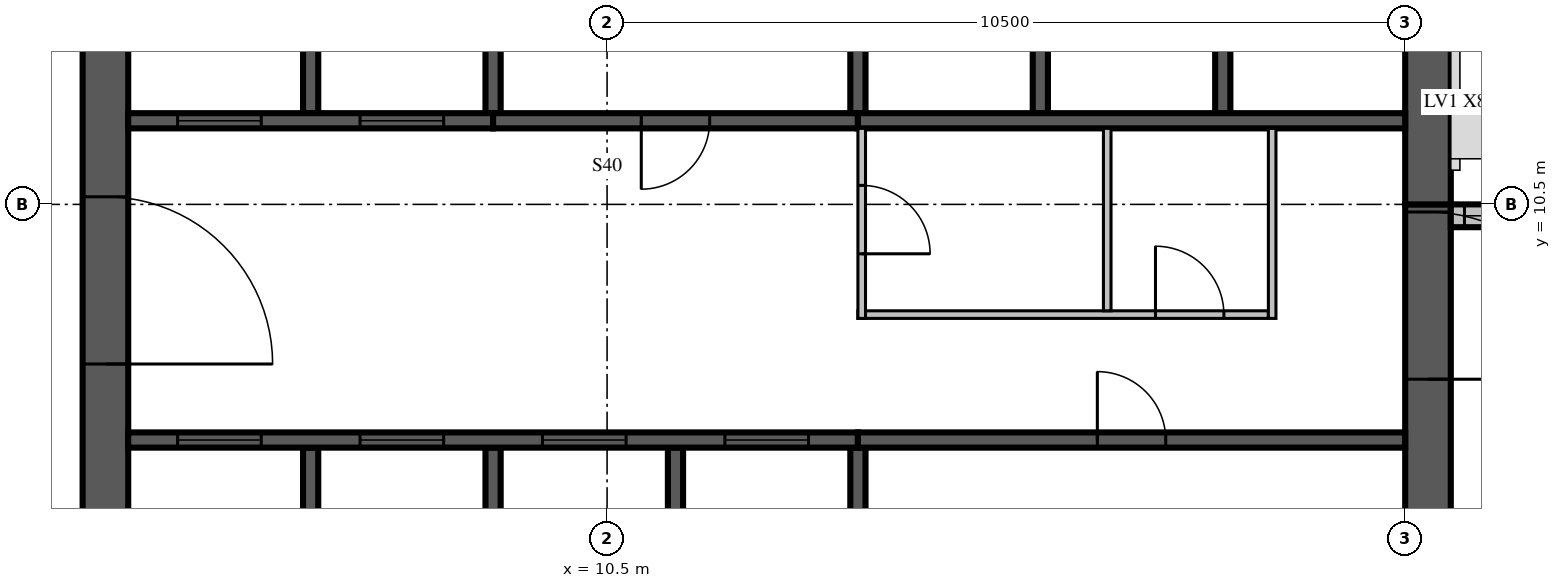
"""IFC4 building model, lengths in metres.
Left out: names, types, materials, properties, quantities, classifications, styles, units other than length and angle.
Written with IfcOpenShell. Run it as: python <this file> out.ifc"""

import sys

from ifc_helpers import new_model, si_unit, direction, frame, frame_2d, origin, place, context, subcontext, project, spatial, rectangle, extrude, source, transform, mapped, element, fill, save


model = new_model("IFC4")
c1 = context("Model", 3, precision=1e-05, world=origin(), true_north=direction((0.0, 1.0)))
c2 = subcontext(c1, "Body", "Model", "MODEL_VIEW")
j1 = project(units=[si_unit("LENGTHUNIT", "METRE"), si_unit("PLANEANGLEUNIT", "RADIAN")], contexts=[c1])
p1 = place(None, origin())
s1 = spatial("IfcSite", under=j1, at=p1, CompositionType="ELEMENT")
p2 = place(p1, origin())
s2 = spatial("IfcBuilding", under=s1, at=p2, CompositionType="ELEMENT")
p3 = place(p2, frame((0.0, 0.0, 309.0)))
s3 = spatial("IfcBuildingStorey", under=s2, at=p3, CompositionType="ELEMENT", Elevation=309.0)
m1 = source(origin(), c2, "Body", "SweptSolid", [
    extrude(rectangle(XDim=17.4, YDim=0.6, at=frame_2d((8.7, 0.0))), origin(), (0.0, 0.0, 1.0), 3.5),
])
p4 = place(p3, frame((3.9, 4.2, 0.0), z_axis=(0.0, 0.0, 1.0), x_axis=(0.0, 1.0, 0.0)))
e1 = element("IfcWall", 1, at=p4, inside=s3, PredefinedType="SHEAR", context=c2, shape_type="MappedRepresentation", body=[
    mapped(m1, transform((0.0, 0.0, 0.0), scale=1.0)),
])
m2 = source(origin(), c2, "Body", "SweptSolid", [
    extrude(rectangle(XDim=2.2, YDim=2.1, at=frame_2d((1.1, 1.05))), frame((0.0, 0.31, 0.0), z_axis=(0.0, -1.0, 0.0), x_axis=(1.0, 0.0, 0.0)), (0.0, 0.0, 1.0), 0.62),
])
p5 = place(p4, frame((4.2, 0.0, 0.0)))
e2 = element("IfcOpeningElement", 2, at=p5, cuts=e1, PredefinedType="OPENING", context=c2, shape_type="MappedRepresentation", body=[
    mapped(m2, transform((0.0, 0.0, 0.0), scale=1.0)),
])
m3 = source(origin(), c2, "Body", "SweptSolid", [
    extrude(rectangle(XDim=6.3, YDim=0.6, at=frame_2d((3.15, 0.0))), origin(), (0.0, 0.0, 1.0), 3.5),
])
p6 = place(p3, frame((21.3, 4.2, 0.0), z_axis=(0.0, 0.0, 1.0), x_axis=(0.0, 1.0, 0.0)))
e3 = element("IfcWall", 3, at=p6, inside=s3, PredefinedType="SHEAR", context=c2, shape_type="MappedRepresentation", body=[
    mapped(m3, transform((0.0, 0.0, 0.0), scale=1.0)),
])
p7 = place(p6, frame((4.0, 0.0, 0.0)))
e4 = element("IfcOpeningElement", 4, at=p7, cuts=e3, PredefinedType="OPENING", context=c2, shape_type="MappedRepresentation", body=[
    mapped(m2, transform((0.0, 0.0, 0.0), scale=1.0)),
])
m4 = source(origin(), c2, "Body", "SweptSolid", [
    extrude(rectangle(XDim=10.5, YDim=0.6, at=frame_2d((5.25, 0.0))), origin(), (0.0, 0.0, 1.0), 3.5),
])
p8 = place(p3, frame((21.3, 10.5, 0.0), z_axis=(0.0, 0.0, 1.0), x_axis=(0.0, 1.0, 0.0)))
e5 = element("IfcWall", 5, at=p8, inside=s3, PredefinedType="SHEAR", context=c2, shape_type="MappedRepresentation", body=[
    mapped(m4, transform((0.0, 0.0, 0.0), scale=1.0)),
])
m5 = source(origin(), c2, "Body", "SweptSolid", [
    extrude(rectangle(XDim=1.2, YDim=2.4, at=frame_2d((0.6, 1.2))), frame((0.0, 0.31, 0.0), z_axis=(0.0, -1.0, 0.0), x_axis=(1.0, 0.0, 0.0)), (0.0, 0.0, 1.0), 0.62),
])
p9 = place(p8, frame((5.7, 0.0, 0.6)))
e6 = element("IfcOpeningElement", 6, at=p9, cuts=e5, PredefinedType="OPENING", context=c2, shape_type="MappedRepresentation", body=[
    mapped(m5, transform((0.0, 0.0, 0.0), scale=1.0)),
])
m6 = source(origin(), c2, "Body", "SweptSolid", [
    extrude(rectangle(XDim=7.45, YDim=0.3, at=frame_2d((3.725, 0.0))), origin(), (0.0, 0.0, 1.0), 3.1),
])
p10 = place(p3, frame((29.05, 10.35, 0.0), z_axis=(0.0, 0.0, 1.0), x_axis=(-1.0, 0.0, 0.0)))
e7 = element("IfcWall", 7, at=p10, inside=s3, PredefinedType="STANDARD", context=c2, shape_type="MappedRepresentation", body=[
    mapped(m6, transform((0.0, 0.0, 0.0), scale=1.0)),
])
m7 = source(origin(), c2, "Body", "SweptSolid", [
    extrude(rectangle(XDim=3.0, YDim=2.0, at=frame_2d((1.5, 1.0))), frame((0.0, 0.16, 0.0), z_axis=(0.0, -1.0, 0.0), x_axis=(1.0, 0.0, 0.0)), (0.0, 0.0, 1.0), 0.32),
])
p11 = place(p10, frame((1.09, 0.0, 0.6)))
e8 = element("IfcOpeningElement", 8, at=p11, cuts=e7, PredefinedType="OPENING", context=c2, shape_type="MappedRepresentation", body=[
    mapped(m7, transform((0.0, 0.0, 0.0), scale=1.0)),
])
m8 = source(origin(), c2, "Body", "SweptSolid", [
    extrude(rectangle(XDim=1.8, YDim=2.0, at=frame_2d((0.9, 1.0))), frame((0.0, 0.16, 0.0), z_axis=(0.0, -1.0, 0.0), x_axis=(1.0, 0.0, 0.0)), (0.0, 0.0, 1.0), 0.32),
])
p12 = place(p10, frame((5.47, 0.0, 0.6)))
e9 = element("IfcOpeningElement", 9, at=p12, cuts=e7, PredefinedType="OPENING", context=c2, shape_type="MappedRepresentation", body=[
    mapped(m8, transform((0.0, 0.0, 0.0), scale=1.0)),
])
m9 = source(origin(), c2, "Body", "SweptSolid", [
    extrude(rectangle(XDim=3.1, YDim=0.2, at=frame_2d((1.55, 0.0))), origin(), (0.0, 0.0, 1.0), 3.5),
])
for number, where, z_axis, x_axis in (
    (10, (6.6, 4.2, 0.0), (0.0, 0.0, 1.0), (0.0, 1.0, 0.0)),
    (11, (9.0, 4.2, 0.0), (0.0, 0.0, 1.0), (0.0, 1.0, 0.0)),
    (12, (11.4, 4.2, 0.0), (0.0, 0.0, 1.0), (0.0, 1.0, 0.0)),
):
    element("IfcWall", number, at=place(p3, frame(where, z_axis=z_axis, x_axis=x_axis)), inside=s3, PredefinedType="SOLIDWALL", context=c2, shape_type="MappedRepresentation", body=[
        mapped(m9, transform((0.0, 0.0, 0.0), scale=1.0)),
    ])
m10 = source(origin(), c2, "Body", "SweptSolid", [
    extrude(rectangle(XDim=3.1, YDim=0.2, at=frame_2d((1.55, 0.0))), origin(), (0.0, 0.0, 1.0), 3.1),
])
p13 = place(p3, frame((13.8, 4.2, 0.0), z_axis=(0.0, 0.0, 1.0), x_axis=(0.0, 1.0, 0.0)))
e13 = element("IfcWall", 13, at=p13, inside=s3, PredefinedType="SOLIDWALL", context=c2, shape_type="MappedRepresentation", body=[
    mapped(m10, transform((0.0, 0.0, 0.0), scale=1.0)),
])
m11 = source(origin(), c2, "Body", "SweptSolid", [
    extrude(rectangle(XDim=3.0, YDim=0.2, at=frame_2d((1.5, 0.0))), origin(), (0.0, 0.0, 1.0), 3.5),
])
p14 = place(p3, frame((6.6, 11.7, 0.0), z_axis=(0.0, 0.0, 1.0), x_axis=(0.0, 1.0, 0.0)))
e14 = element("IfcWall", 14, at=p14, inside=s3, PredefinedType="SOLIDWALL", context=c2, shape_type="MappedRepresentation", body=[
    mapped(m11, transform((0.0, 0.0, 0.0), scale=1.0)),
])
m12 = source(origin(), c2, "Body", "SweptSolid", [
    extrude(rectangle(XDim=3.0, YDim=0.2, at=frame_2d((1.5, 0.0))), origin(), (0.0, 0.0, 1.0), 3.1),
])
for number, where, z_axis, x_axis in (
    (15, (9.0, 11.7, 0.0), (0.0, 0.0, 1.0), (0.0, 1.0, 0.0)),
    (16, (13.8, 11.7, 0.0), (0.0, 0.0, 1.0), (0.0, 1.0, 0.0)),
):
    element("IfcWall", number, at=place(p3, frame(where, z_axis=z_axis, x_axis=x_axis)), inside=s3, PredefinedType="SOLIDWALL", context=c2, shape_type="MappedRepresentation", body=[
        mapped(m12, transform((0.0, 0.0, 0.0), scale=1.0)),
    ])
for number, where, z_axis, x_axis in (
    (17, (16.2, 11.7, 0.0), (0.0, 0.0, 1.0), (0.0, 1.0, 0.0)),
    (18, (18.6, 11.7, 0.0), (0.0, 0.0, 1.0), (0.0, 1.0, 0.0)),
):
    element("IfcWall", number, at=place(p3, frame(where, z_axis=z_axis, x_axis=x_axis)), inside=s3, PredefinedType="SOLIDWALL", context=c2, shape_type="MappedRepresentation", body=[
        mapped(m11, transform((0.0, 0.0, 0.0), scale=1.0)),
    ])
m13 = source(origin(), c2, "Body", "SweptSolid", [
    extrude(rectangle(XDim=9.6, YDim=0.2, at=frame_2d((4.8, 0.0))), origin(), (0.0, 0.0, 1.0), 3.5),
])
p15 = place(p3, frame((4.2, 7.4, 0.0), z_axis=(0.0, 0.0, 1.0), x_axis=(1.0, 0.0, 0.0)))
e19 = element("IfcWall", 19, at=p15, inside=s3, PredefinedType="SOLIDWALL", context=c2, shape_type="MappedRepresentation", body=[
    mapped(m13, transform((0.0, 0.0, 0.0), scale=1.0)),
])
m14 = source(origin(), c2, "Body", "SweptSolid", [
    extrude(rectangle(XDim=1.1, YDim=2.1, at=frame_2d((0.55, 1.05))), frame((0.0, 0.11, 0.0), z_axis=(0.0, -1.0, 0.0), x_axis=(1.0, 0.0, 0.0)), (0.0, 0.0, 1.0), 0.22),
])
p16 = place(p15, frame((0.65, 0.0, 0.0)))
e20 = element("IfcOpeningElement", 20, at=p16, cuts=e19, PredefinedType="OPENING", context=c2, shape_type="MappedRepresentation", body=[
    mapped(m14, transform((0.0, 0.0, 0.0), scale=1.0)),
])
p17 = place(p15, frame((3.05, 0.0, 0.0)))
e21 = element("IfcOpeningElement", 21, at=p17, cuts=e19, PredefinedType="OPENING", context=c2, shape_type="MappedRepresentation", body=[
    mapped(m14, transform((0.0, 0.0, 0.0), scale=1.0)),
])
p18 = place(p15, frame((5.45, 0.0, 0.0)))
e22 = element("IfcOpeningElement", 22, at=p18, cuts=e19, PredefinedType="OPENING", context=c2, shape_type="MappedRepresentation", body=[
    mapped(m14, transform((0.0, 0.0, 0.0), scale=1.0)),
])
p19 = place(p15, frame((7.85, 0.0, 0.0)))
e23 = element("IfcOpeningElement", 23, at=p19, cuts=e19, PredefinedType="OPENING", context=c2, shape_type="MappedRepresentation", body=[
    mapped(m14, transform((0.0, 0.0, 0.0), scale=1.0)),
])
m15 = source(origin(), c2, "Body", "SweptSolid", [
    extrude(rectangle(XDim=7.2, YDim=0.2, at=frame_2d((3.6, 0.0))), origin(), (0.0, 0.0, 1.0), 3.1),
])
p20 = place(p3, frame((13.8, 7.4, 0.0), z_axis=(0.0, 0.0, 1.0), x_axis=(1.0, 0.0, 0.0)))
e24 = element("IfcWall", 24, at=p20, inside=s3, PredefinedType="SOLIDWALL", context=c2, shape_type="MappedRepresentation", body=[
    mapped(m15, transform((0.0, 0.0, 0.0), scale=1.0)),
])
m16 = source(origin(), c2, "Body", "SweptSolid", [
    extrude(rectangle(XDim=0.9, YDim=2.1, at=frame_2d((0.45, 1.05))), frame((0.0, 0.11, 0.0), z_axis=(0.0, -1.0, 0.0), x_axis=(1.0, 0.0, 0.0)), (0.0, 0.0, 1.0), 0.22),
])
p21 = place(p20, frame((3.15, 0.0, 0.0)))
e25 = element("IfcOpeningElement", 25, at=p21, cuts=e24, PredefinedType="OPENING", context=c2, shape_type="MappedRepresentation", body=[
    mapped(m16, transform((0.0, 0.0, 0.0), scale=1.0)),
])
m17 = source(origin(), c2, "Body", "SweptSolid", [
    extrude(rectangle(XDim=4.8, YDim=0.2, at=frame_2d((2.4, 0.0))), origin(), (0.0, 0.0, 1.0), 3.5),
])
p22 = place(p3, frame((4.2, 11.6, 0.0), z_axis=(0.0, 0.0, 1.0), x_axis=(1.0, 0.0, 0.0)))
e26 = element("IfcWall", 26, at=p22, inside=s3, PredefinedType="SOLIDWALL", context=c2, shape_type="MappedRepresentation", body=[
    mapped(m17, transform((0.0, 0.0, 0.0), scale=1.0)),
])
p23 = place(p22, frame((0.65, 0.0, 0.0)))
e27 = element("IfcOpeningElement", 27, at=p23, cuts=e26, PredefinedType="OPENING", context=c2, shape_type="MappedRepresentation", body=[
    mapped(m14, transform((0.0, 0.0, 0.0), scale=1.0)),
])
p24 = place(p22, frame((3.05, 0.0, 0.0)))
e28 = element("IfcOpeningElement", 28, at=p24, cuts=e26, PredefinedType="OPENING", context=c2, shape_type="MappedRepresentation", body=[
    mapped(m14, transform((0.0, 0.0, 0.0), scale=1.0)),
])
m18 = source(origin(), c2, "Body", "SweptSolid", [
    extrude(rectangle(XDim=4.8, YDim=0.2, at=frame_2d((2.4, 0.0))), origin(), (0.0, 0.0, 1.0), 3.1),
])
p25 = place(p3, frame((9.0, 11.6, 0.0), z_axis=(0.0, 0.0, 1.0), x_axis=(1.0, 0.0, 0.0)))
e29 = element("IfcWall", 29, at=p25, inside=s3, PredefinedType="SOLIDWALL", context=c2, shape_type="MappedRepresentation", body=[
    mapped(m18, transform((0.0, 0.0, 0.0), scale=1.0)),
])
p26 = place(p25, frame((1.95, 0.0, 0.0)))
e30 = element("IfcOpeningElement", 30, at=p26, cuts=e29, PredefinedType="OPENING", context=c2, shape_type="MappedRepresentation", body=[
    mapped(m16, transform((0.0, 0.0, 0.0), scale=1.0)),
])
m19 = source(origin(), c2, "Body", "SweptSolid", [
    extrude(rectangle(XDim=7.2, YDim=0.2, at=frame_2d((3.6, 0.0))), origin(), (0.0, 0.0, 1.0), 3.5),
])
p27 = place(p3, frame((13.8, 11.6, 0.0), z_axis=(0.0, 0.0, 1.0), x_axis=(1.0, 0.0, 0.0)))
e31 = element("IfcWall", 31, at=p27, inside=s3, PredefinedType="SOLIDWALL", context=c2, shape_type="MappedRepresentation", body=[
    mapped(m19, transform((0.0, 0.0, 0.0), scale=1.0)),
])
m20 = source(origin(), c2, "Body", "SweptSolid", [
    extrude(rectangle(XDim=5.4, YDim=0.1, at=frame_2d((2.7, 0.0))), origin(), (0.0, 0.0, 1.0), 3.1),
])
p28 = place(p3, frame((13.8, 9.05, 0.0), z_axis=(0.0, 0.0, 1.0), x_axis=(1.0, 0.0, 0.0)))
e32 = element("IfcWall", 32, at=p28, inside=s3, PredefinedType="PARTITIONING", context=c2, shape_type="MappedRepresentation", body=[
    mapped(m20, transform((0.0, 0.0, 0.0), scale=1.0)),
])
m21 = source(origin(), c2, "Body", "SweptSolid", [
    extrude(rectangle(XDim=0.9, YDim=2.1, at=frame_2d((0.45, 1.05))), frame((0.0, 0.06, 0.0), z_axis=(0.0, -1.0, 0.0), x_axis=(1.0, 0.0, 0.0)), (0.0, 0.0, 1.0), 0.12),
])
p29 = place(p28, frame((3.915, 0.0, 0.0)))
e33 = element("IfcOpeningElement", 33, at=p29, cuts=e32, PredefinedType="OPENING", context=c2, shape_type="MappedRepresentation", body=[
    mapped(m21, transform((0.0, 0.0, 0.0), scale=1.0)),
])
m22 = source(origin(), c2, "Body", "SweptSolid", [
    extrude(rectangle(XDim=2.5, YDim=0.1, at=frame_2d((1.25, 0.0))), origin(), (0.0, 0.0, 1.0), 3.1),
])
p30 = place(p3, frame((13.85, 9.0, 0.0), z_axis=(0.0, 0.0, 1.0), x_axis=(0.0, 1.0, 0.0)))
e34 = element("IfcWall", 34, at=p30, inside=s3, PredefinedType="PARTITIONING", context=c2, shape_type="MappedRepresentation", body=[
    mapped(m22, transform((0.0, 0.0, 0.0), scale=1.0)),
])
p31 = place(p30, frame((0.85, 0.0, 0.0)))
e35 = element("IfcOpeningElement", 35, at=p31, cuts=e34, PredefinedType="OPENING", context=c2, shape_type="MappedRepresentation", body=[
    mapped(m21, transform((0.0, 0.0, 0.0), scale=1.0)),
])
m23 = source(origin(), c2, "Body", "SweptSolid", [
    extrude(rectangle(XDim=2.4, YDim=0.1, at=frame_2d((1.2, 0.0))), origin(), (0.0, 0.0, 1.0), 3.1),
])
p32 = place(p3, frame((17.08, 9.1, 0.0), z_axis=(0.0, 0.0, 1.0), x_axis=(0.0, 1.0, 0.0)))
e36 = element("IfcWall", 36, at=p32, inside=s3, PredefinedType="PARTITIONING", context=c2, shape_type="MappedRepresentation", body=[
    mapped(m23, transform((0.0, 0.0, 0.0), scale=1.0)),
])
p33 = place(p3, frame((19.25, 9.0, 0.0), z_axis=(0.0, 0.0, 1.0), x_axis=(0.0, 1.0, 0.0)))
e37 = element("IfcWall", 37, at=p33, inside=s3, PredefinedType="PARTITIONING", context=c2, shape_type="MappedRepresentation", body=[
    mapped(m22, transform((0.0, 0.0, 0.0), scale=1.0)),
])
m24 = source(origin(), c2, "Body", "SweptSolid", [
    extrude(rectangle(XDim=1.8, YDim=2.0, at=frame_2d((0.9, 1.0))), frame((0.0, 0.03, 0.0), z_axis=(0.0, -1.0, 0.0), x_axis=(1.0, 0.0, 0.0)), (0.0, 0.0, 1.0), 0.06),
])
p34 = place(p12, origin())
e38 = element("IfcWindow", 38, at=p34, inside=s3, PartitioningType="SINGLE_PANEL", PredefinedType="WINDOW", context=c2, shape_type="MappedRepresentation", body=[
    mapped(m24, transform((0.0, 0.0, 0.0), scale=1.0)),
])
fill(e9, e38)
m25 = source(origin(), c2, "Body", "SweptSolid", [
    extrude(rectangle(XDim=1.1, YDim=2.1, at=frame_2d((0.55, 1.05))), frame((0.0, 0.025, 0.0), z_axis=(0.0, -1.0, 0.0), x_axis=(1.0, 0.0, 0.0)), (0.0, 0.0, 1.0), 0.05),
])
p35 = place(p16, origin())
e39 = element("IfcDoor", 39, at=p35, inside=s3, OperationType="SLIDING_TO_LEFT", PredefinedType="DOOR", context=c2, shape_type="MappedRepresentation", body=[
    mapped(m25, transform((0.0, 0.0, 0.0), scale=1.0)),
])
fill(e20, e39)
p36 = place(p17, origin())
e40 = element("IfcDoor", 40, at=p36, inside=s3, OperationType="SLIDING_TO_LEFT", PredefinedType="DOOR", context=c2, shape_type="MappedRepresentation", body=[
    mapped(m25, transform((0.0, 0.0, 0.0), scale=1.0)),
])
fill(e21, e40)
p37 = place(p18, origin())
e41 = element("IfcDoor", 41, at=p37, inside=s3, OperationType="SLIDING_TO_LEFT", PredefinedType="DOOR", context=c2, shape_type="MappedRepresentation", body=[
    mapped(m25, transform((0.0, 0.0, 0.0), scale=1.0)),
])
fill(e22, e41)
p38 = place(p19, origin())
e42 = element("IfcDoor", 42, at=p38, inside=s3, OperationType="SLIDING_TO_LEFT", PredefinedType="DOOR", context=c2, shape_type="MappedRepresentation", body=[
    mapped(m25, transform((0.0, 0.0, 0.0), scale=1.0)),
])
fill(e23, e42)
m26 = source(origin(), c2, "Body", "SweptSolid", [
    extrude(rectangle(XDim=0.9, YDim=2.1, at=frame_2d((0.45, 1.05))), frame((0.0, 0.025, 0.0), z_axis=(0.0, -1.0, 0.0), x_axis=(1.0, 0.0, 0.0)), (0.0, 0.0, 1.0), 0.05),
])
p39 = place(p21, origin())
e43 = element("IfcDoor", 43, at=p39, inside=s3, OperationType="SINGLE_SWING_LEFT", PredefinedType="DOOR", context=c2, shape_type="MappedRepresentation", body=[
    mapped(m26, transform((0.0, 0.0, 0.0), scale=1.0)),
])
fill(e25, e43)
p40 = place(p23, origin())
e44 = element("IfcDoor", 44, at=p40, inside=s3, OperationType="SLIDING_TO_LEFT", PredefinedType="DOOR", context=c2, shape_type="MappedRepresentation", body=[
    mapped(m25, transform((0.0, 0.0, 0.0), scale=1.0)),
])
fill(e27, e44)
p41 = place(p24, origin())
e45 = element("IfcDoor", 45, at=p41, inside=s3, OperationType="SLIDING_TO_LEFT", PredefinedType="DOOR", context=c2, shape_type="MappedRepresentation", body=[
    mapped(m25, transform((0.0, 0.0, 0.0), scale=1.0)),
])
fill(e28, e45)
p42 = place(p26, origin())
e46 = element("IfcDoor", 46, at=p42, inside=s3, OperationType="SINGLE_SWING_RIGHT", PredefinedType="DOOR", context=c2, shape_type="MappedRepresentation", body=[
    mapped(m26, transform((0.0, 0.0, 0.0), scale=1.0)),
])
fill(e30, e46)
p43 = place(p29, origin())
e47 = element("IfcDoor", 47, at=p43, inside=s3, OperationType="SINGLE_SWING_LEFT", PredefinedType="DOOR", context=c2, shape_type="MappedRepresentation", body=[
    mapped(m26, transform((0.0, 0.0, 0.0), scale=1.0)),
])
fill(e33, e47)
p44 = place(p31, origin())
e48 = element("IfcDoor", 48, at=p44, inside=s3, OperationType="SINGLE_SWING_RIGHT", PredefinedType="DOOR", context=c2, shape_type="MappedRepresentation", body=[
    mapped(m26, transform((0.0, 0.0, 0.0), scale=1.0)),
])
fill(e35, e48)
m27 = source(origin(), c2, "Body", "SweptSolid", [
    extrude(rectangle(XDim=2.2, YDim=2.1, at=frame_2d((1.1, 1.05))), frame((0.0, 0.025, 0.0), z_axis=(0.0, -1.0, 0.0), x_axis=(1.0, 0.0, 0.0)), (0.0, 0.0, 1.0), 0.05),
])
p45 = place(p7, origin())
e49 = element("IfcDoor", 49, at=p45, inside=s3, OperationType="DOUBLE_DOOR_SINGLE_SWING", PredefinedType="DOOR", context=c2, shape_type="MappedRepresentation", body=[
    mapped(m27, transform((0.0, 0.0, 0.0), scale=1.0)),
])
fill(e4, e49)
p46 = place(p5, origin())
e50 = element("IfcDoor", 50, at=p46, inside=s3, OperationType="DOUBLE_DOOR_SINGLE_SWING", PredefinedType="DOOR", context=c2, shape_type="MappedRepresentation", body=[
    mapped(m27, transform((0.0, 0.0, 0.0), scale=1.0)),
])
fill(e2, e50)
save(model, sys.argv[1])
